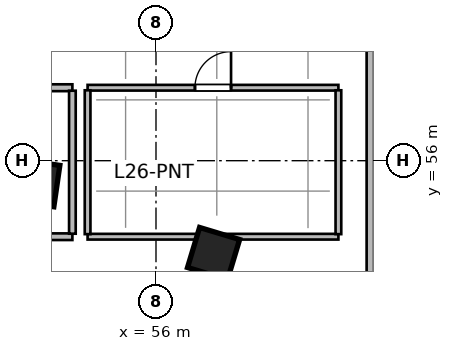
"""IFC4 building model, lengths in metres.
Left out: names, types, materials, properties, quantities, classifications, styles, units other than length and angle.
Written with IfcOpenShell. Run it as: python <this file> out.ifc"""

import sys

from ifc_helpers import new_model, si_unit, direction, frame, frame_2d, origin, origin_2d, place, context, subcontext, project, spatial, rectangle, extrude, source, transform, mapped, element, fill, save


model = new_model("IFC4")
c1 = context("Model", 3, precision=1e-05, world=origin(), true_north=direction((0.0, 1.0)))
c2 = subcontext(c1, "Body", "Model", "MODEL_VIEW")
j1 = project(units=[si_unit("LENGTHUNIT", "METRE"), si_unit("PLANEANGLEUNIT", "RADIAN")], contexts=[c1])
p1 = place(None, origin())
s1 = spatial("IfcSite", under=j1, at=p1, CompositionType="ELEMENT")
p2 = place(p1, origin())
s2 = spatial("IfcBuilding", under=s1, at=p2, CompositionType="ELEMENT")
p3 = place(p2, frame((0.0, 0.0, 111.6)))
s3 = spatial("IfcBuildingStorey", under=s2, at=p3, CompositionType="ELEMENT", Elevation=111.6)
m1 = source(origin(), c2, "Body", "SweptSolid", [
    extrude(rectangle(XDim=1.1, YDim=1.1, at=origin_2d()), origin(), (0.0, 0.0, 1.0), 3.9),
])
for number, where, z_axis, x_axis in (
    (1, (52.846, 55.411, 0.0), (0.0, 0.0, 1.0), (0.143, 0.99, 0.0)),
    (2, (57.515, 53.558, 0.0), (0.0, 0.0, 1.0), (0.289, 0.957, 0.0)),
):
    element("IfcColumn", number, at=place(p3, frame(where, z_axis=z_axis, x_axis=x_axis)), inside=s3, PredefinedType="COLUMN", context=c2, shape_type="MappedRepresentation", body=[
        mapped(m1, transform((0.0, 0.0, 0.0), scale=1.0)),
    ])
m2 = source(origin(), c2, "Body", "SweptSolid", [
    extrude(rectangle(XDim=3.248, YDim=0.175, at=frame_2d((1.624, 0.0))), origin(), (0.0, 0.0, 1.0), 3.65),
])
p4 = place(p3, frame((50.552, 54.0, 0.0), z_axis=(0.0, 0.0, 1.0), x_axis=(1.0, 0.0, 0.0)))
e3 = element("IfcWall", 3, at=p4, inside=s3, PredefinedType="PARTITIONING", context=c2, shape_type="MappedRepresentation", body=[
    mapped(m2, transform((0.0, 0.0, 0.0), scale=1.0)),
])
m3 = source(origin(), c2, "Body", "SweptSolid", [
    extrude(rectangle(XDim=3.248, YDim=0.18, at=frame_2d((1.624, 0.0))), origin(), (0.0, 0.0, 1.0), 3.65),
])
p5 = place(p3, frame((50.552, 57.92, 0.0), z_axis=(0.0, 0.0, 1.0), x_axis=(1.0, 0.0, 0.0)))
e4 = element("IfcWall", 4, at=p5, inside=s3, PredefinedType="PLUMBINGWALL", context=c2, shape_type="MappedRepresentation", body=[
    mapped(m3, transform((0.0, 0.0, 0.0), scale=1.0)),
])
p6 = place(p5, frame((1.149, 0.0, 0.0)))
e5 = element("IfcOpeningElement", 5, at=p6, cuts=e4, PredefinedType="OPENING", context=c2, shape_type="SweptSolid", body=[
    extrude(rectangle(XDim=0.95, YDim=2.12, at=frame_2d((0.475, 1.06))), frame((0.0, 0.1, 0.0), z_axis=(0.0, -1.0, 0.0), x_axis=(1.0, 0.0, 0.0)), (0.0, 0.0, 1.0), 0.2),
])
m4 = source(origin(), c2, "Body", "SweptSolid", [
    extrude(rectangle(XDim=3.763, YDim=0.175, at=frame_2d((1.881, 0.0))), origin(), (0.0, 0.0, 1.0), 3.65),
])
p7 = place(p3, frame((53.8, 54.079, 0.0), z_axis=(0.0, 0.0, 1.0), x_axis=(0.0, 1.0, 0.0)))
e6 = element("IfcWall", 6, at=p7, inside=s3, PredefinedType="PARTITIONING", context=c2, shape_type="MappedRepresentation", body=[
    mapped(m4, transform((0.0, 0.0, 0.0), scale=1.0)),
])
m5 = source(origin(), c2, "Body", "SweptSolid", [
    extrude(rectangle(XDim=6.6, YDim=0.15, at=frame_2d((3.3, 0.0))), origin(), (0.0, 0.0, 1.0), 3.095),
])
p8 = place(p3, frame((54.2, 54.0, 0.0), z_axis=(0.0, 0.0, 1.0), x_axis=(1.0, 0.0, 0.0)))
e7 = element("IfcWall", 7, at=p8, inside=s3, PredefinedType="PARTITIONING", context=c2, shape_type="MappedRepresentation", body=[
    mapped(m5, transform((0.0, 0.0, 0.0), scale=1.0)),
])
m6 = source(origin(), c2, "Body", "SweptSolid", [
    extrude(rectangle(XDim=6.6, YDim=0.15, at=frame_2d((3.3, 0.0))), origin(), (0.0, 0.0, 1.0), 3.65),
])
p9 = place(p3, frame((54.2, 57.92, 0.0), z_axis=(0.0, 0.0, 1.0), x_axis=(1.0, 0.0, 0.0)))
e8 = element("IfcWall", 8, at=p9, inside=s3, PredefinedType="PARTITIONING", context=c2, shape_type="MappedRepresentation", body=[
    mapped(m6, transform((0.0, 0.0, 0.0), scale=1.0)),
])
p10 = place(p9, frame((2.825, 0.0, 0.0)))
e9 = element("IfcOpeningElement", 9, at=p10, cuts=e8, PredefinedType="OPENING", context=c2, shape_type="SweptSolid", body=[
    extrude(rectangle(XDim=0.95, YDim=2.1, at=frame_2d((0.475, 1.05))), frame((0.0, 0.085, 0.0), z_axis=(0.0, -1.0, 0.0), x_axis=(1.0, 0.0, 0.0)), (0.0, 0.0, 1.0), 0.17),
])
m7 = source(origin(), c2, "Body", "SweptSolid", [
    extrude(rectangle(XDim=3.785, YDim=0.15, at=frame_2d((1.893, 0.0))), origin(), (0.0, 0.0, 1.0), 3.65),
])
for number, where, z_axis, x_axis in (
    (10, (54.2, 54.067, 0.0), (0.0, 0.0, 1.0), (0.0, 1.0, 0.0)),
    (11, (60.8, 54.067, 0.0), (0.0, 0.0, 1.0), (0.0, 1.0, 0.0)),
):
    element("IfcWall", number, at=place(p3, frame(where, z_axis=z_axis, x_axis=x_axis)), inside=s3, PredefinedType="PARTITIONING", context=c2, shape_type="MappedRepresentation", body=[
        mapped(m7, transform((0.0, 0.0, 0.0), scale=1.0)),
    ])
m8 = source(origin(), c2, "Body", "SweptSolid", [
    extrude(rectangle(XDim=13.988, YDim=0.195, at=frame_2d((6.994, 0.0))), origin(), (0.0, 0.0, 1.0), 2.942),
])
p11 = place(p3, frame((61.64, 47.472, 0.0), z_axis=(0.0, 0.0, 1.0), x_axis=(0.0, 1.0, 0.0)))
e12 = element("IfcWall", 12, at=p11, inside=s3, PredefinedType="PARTITIONING", context=c2, shape_type="MappedRepresentation", body=[
    mapped(m8, transform((0.0, 0.0, 0.0), scale=1.0)),
])
m9 = source(origin(), c2, "Body", "SweptSolid", [
    extrude(rectangle(XDim=0.95, YDim=2.1, at=frame_2d((0.475, 1.05))), frame((0.0, 0.025, 0.0), z_axis=(0.0, -1.0, 0.0), x_axis=(1.0, 0.0, 0.0)), (0.0, 0.0, 1.0), 0.05),
])
p12 = place(p10, origin())
e13 = element("IfcDoor", 13, at=p12, inside=s3, OperationType="SINGLE_SWING_RIGHT", PredefinedType="DOOR", context=c2, shape_type="MappedRepresentation", body=[
    mapped(m9, transform((0.0, 0.0, 0.0), scale=1.0)),
])
fill(e9, e13)
save(model, sys.argv[1])
